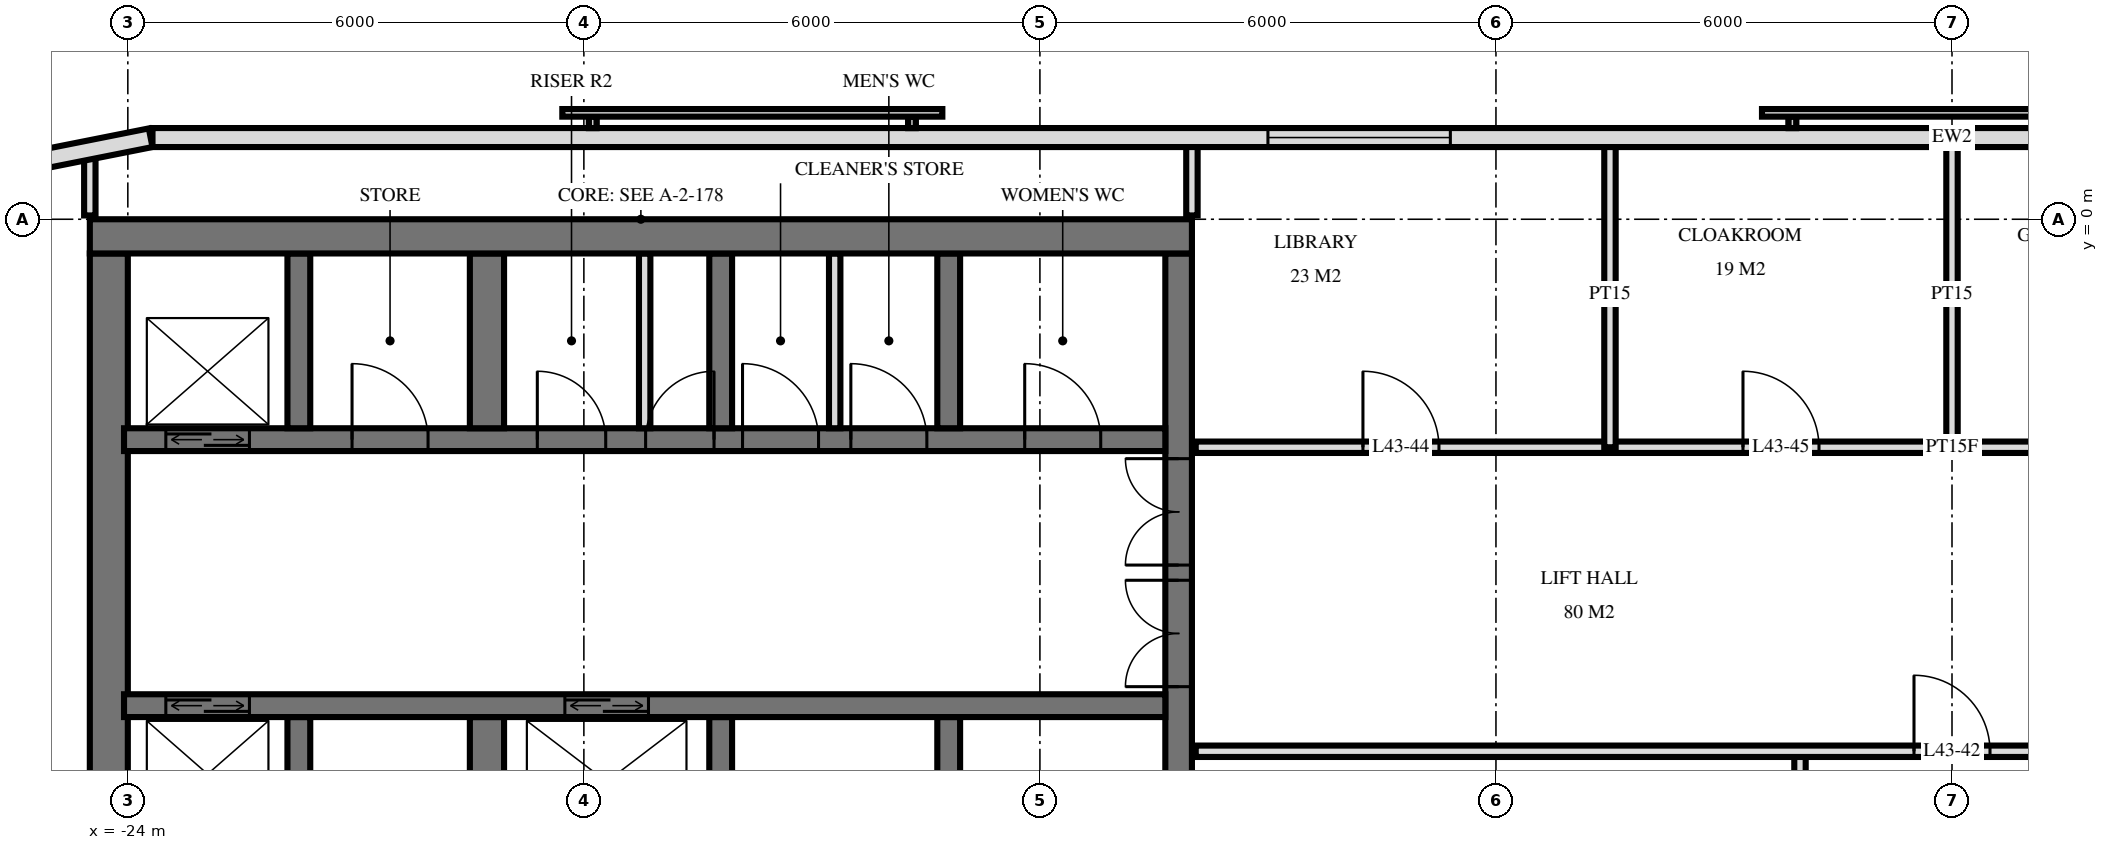
"""IFC4 building model, lengths in metres.
Left out: names, types, materials, properties, quantities, classifications, styles, units other than length and angle.
Written with IfcOpenShell. Run it as: python <this file> out.ifc"""

import sys

from ifc_helpers import new_model, si_unit, direction, frame, frame_2d, origin, place, context, subcontext, project, spatial, rectangle, extrude, element, fill, save


model = new_model("IFC4")
c1 = context("Model", 3, precision=1e-05, world=origin(), true_north=direction((0.0, 1.0)))
c2 = subcontext(c1, "Body", "Model", "MODEL_VIEW")
j1 = project(units=[si_unit("LENGTHUNIT", "METRE"), si_unit("PLANEANGLEUNIT", "RADIAN")], contexts=[c1])
p1 = place(None, origin())
s1 = spatial("IfcSite", under=j1, at=p1, CompositionType="ELEMENT")
p2 = place(p1, origin())
s2 = spatial("IfcBuilding", under=s1, at=p2, CompositionType="ELEMENT")
p3 = place(p2, frame((0.0, 0.0, 166.8)))
s3 = spatial("IfcBuildingStorey", under=s2, at=p3, CompositionType="ELEMENT", Elevation=166.8)
p4 = place(p3, frame((-24.5, -0.225, 0.0), z_axis=(0.0, 0.0, 1.0), x_axis=(1.0, 0.0, 0.0)))
e1 = element("IfcWall", 1, at=p4, inside=s3, PredefinedType="SHEAR", context=c2, shape_type="SweptSolid", body=[
    extrude(rectangle(XDim=14.5, YDim=0.45, at=frame_2d((7.25, 0.0))), origin(), (0.0, 0.0, 1.0), 3.6),
])
p5 = place(p3, frame((-10.175, -14.55, 0.0), z_axis=(0.0, 0.0, 1.0), x_axis=(0.0, 1.0, 0.0)))
e2 = element("IfcWall", 2, at=p5, inside=s3, PredefinedType="SHEAR", context=c2, shape_type="SweptSolid", body=[
    extrude(rectangle(XDim=14.1, YDim=0.35, at=frame_2d((7.05, 0.0))), origin(), (0.0, 0.0, 1.0), 3.6),
])
p6 = place(p5, frame((8.4, 0.0, 0.0)))
e3 = element("IfcOpeningElement", 3, at=p6, cuts=e2, PredefinedType="OPENING", context=c2, shape_type="SweptSolid", body=[
    extrude(rectangle(XDim=1.4, YDim=2.4, at=frame_2d((0.7, 1.2))), frame((0.0, 0.185, 0.0), z_axis=(0.0, -1.0, 0.0), x_axis=(1.0, 0.0, 0.0)), (0.0, 0.0, 1.0), 0.37),
])
p7 = place(p5, frame((10.0, 0.0, 0.0)))
e4 = element("IfcOpeningElement", 4, at=p7, cuts=e2, PredefinedType="OPENING", context=c2, shape_type="SweptSolid", body=[
    extrude(rectangle(XDim=1.4, YDim=2.4, at=frame_2d((0.7, 1.2))), frame((0.0, 0.185, 0.0), z_axis=(0.0, -1.0, 0.0), x_axis=(1.0, 0.0, 0.0)), (0.0, 0.0, 1.0), 0.37),
])
p8 = place(p5, frame((4.0, 0.0, 0.0)))
e5 = element("IfcOpeningElement", 5, at=p8, cuts=e2, PredefinedType="OPENING", context=c2, shape_type="SweptSolid", body=[
    extrude(rectangle(XDim=1.2, YDim=2.1, at=frame_2d((0.6, 1.05))), frame((0.0, 0.185, 0.0), z_axis=(0.0, -1.0, 0.0), x_axis=(1.0, 0.0, 0.0)), (0.0, 0.0, 1.0), 0.37),
])
p9 = place(p3, frame((-24.25, -14.55, 0.0), z_axis=(0.0, 0.0, 1.0), x_axis=(0.0, 1.0, 0.0)))
e6 = element("IfcWall", 6, at=p9, inside=s3, PredefinedType="SHEAR", context=c2, shape_type="SweptSolid", body=[
    extrude(rectangle(XDim=14.1, YDim=0.5, at=frame_2d((7.05, 0.0))), origin(), (0.0, 0.0, 1.0), 3.6),
])
p10 = place(p3, frame((-24.05, -2.9, 0.0), z_axis=(0.0, 0.0, 1.0), x_axis=(1.0, 0.0, 0.0)))
e7 = element("IfcWall", 7, at=p10, inside=s3, PredefinedType="SHEAR", context=c2, shape_type="SweptSolid", body=[
    extrude(rectangle(XDim=13.7, YDim=0.3, at=frame_2d((6.85, 0.0))), origin(), (0.0, 0.0, 1.0), 3.6),
])
p11 = place(p10, frame((0.55, 0.0, 0.0)))
e8 = element("IfcOpeningElement", 8, at=p11, cuts=e7, PredefinedType="OPENING", context=c2, shape_type="SweptSolid", body=[
    extrude(rectangle(XDim=1.1, YDim=2.1, at=frame_2d((0.55, 1.05))), frame((0.0, 0.16, 0.0), z_axis=(0.0, -1.0, 0.0), x_axis=(1.0, 0.0, 0.0)), (0.0, 0.0, 1.0), 0.32),
])
p12 = place(p10, frame((6.863, 0.0, 0.0)))
e9 = element("IfcOpeningElement", 9, at=p12, cuts=e7, PredefinedType="OPENING", context=c2, shape_type="SweptSolid", body=[
    extrude(rectangle(XDim=0.9, YDim=2.1, at=frame_2d((0.45, 1.05))), frame((0.0, 0.16, 0.0), z_axis=(0.0, -1.0, 0.0), x_axis=(1.0, 0.0, 0.0)), (0.0, 0.0, 1.0), 0.32),
])
p13 = place(p10, frame((5.438, 0.0, 0.0)))
e10 = element("IfcOpeningElement", 10, at=p13, cuts=e7, PredefinedType="OPENING", context=c2, shape_type="SweptSolid", body=[
    extrude(rectangle(XDim=0.9, YDim=2.1, at=frame_2d((0.45, 1.05))), frame((0.0, 0.16, 0.0), z_axis=(0.0, -1.0, 0.0), x_axis=(1.0, 0.0, 0.0)), (0.0, 0.0, 1.0), 0.32),
])
p14 = place(p10, frame((11.85, 0.0, 0.0)))
e11 = element("IfcOpeningElement", 11, at=p14, cuts=e7, PredefinedType="OPENING", context=c2, shape_type="SweptSolid", body=[
    extrude(rectangle(XDim=1.0, YDim=2.1, at=frame_2d((0.5, 1.05))), frame((0.0, 0.16, 0.0), z_axis=(0.0, -1.0, 0.0), x_axis=(1.0, 0.0, 0.0)), (0.0, 0.0, 1.0), 0.32),
])
p15 = place(p10, frame((9.562, 0.0, 0.0)))
e12 = element("IfcOpeningElement", 12, at=p15, cuts=e7, PredefinedType="OPENING", context=c2, shape_type="SweptSolid", body=[
    extrude(rectangle(XDim=1.0, YDim=2.1, at=frame_2d((0.5, 1.05))), frame((0.0, 0.16, 0.0), z_axis=(0.0, -1.0, 0.0), x_axis=(1.0, 0.0, 0.0)), (0.0, 0.0, 1.0), 0.32),
])
p16 = place(p10, frame((8.137, 0.0, 0.0)))
e13 = element("IfcOpeningElement", 13, at=p16, cuts=e7, PredefinedType="OPENING", context=c2, shape_type="SweptSolid", body=[
    extrude(rectangle(XDim=1.0, YDim=2.1, at=frame_2d((0.5, 1.05))), frame((0.0, 0.16, 0.0), z_axis=(0.0, -1.0, 0.0), x_axis=(1.0, 0.0, 0.0)), (0.0, 0.0, 1.0), 0.32),
])
p17 = place(p10, frame((3.0, 0.0, 0.0)))
e14 = element("IfcOpeningElement", 14, at=p17, cuts=e7, PredefinedType="OPENING", context=c2, shape_type="SweptSolid", body=[
    extrude(rectangle(XDim=1.0, YDim=2.1, at=frame_2d((0.5, 1.05))), frame((0.0, 0.16, 0.0), z_axis=(0.0, -1.0, 0.0), x_axis=(1.0, 0.0, 0.0)), (0.0, 0.0, 1.0), 0.32),
])
p18 = place(p3, frame((-24.05, -6.4, 0.0), z_axis=(0.0, 0.0, 1.0), x_axis=(1.0, 0.0, 0.0)))
e15 = element("IfcWall", 15, at=p18, inside=s3, PredefinedType="SHEAR", context=c2, shape_type="SweptSolid", body=[
    extrude(rectangle(XDim=13.7, YDim=0.3, at=frame_2d((6.85, 0.0))), origin(), (0.0, 0.0, 1.0), 3.6),
])
p19 = place(p18, frame((0.55, 0.0, 0.0)))
e16 = element("IfcOpeningElement", 16, at=p19, cuts=e15, PredefinedType="OPENING", context=c2, shape_type="SweptSolid", body=[
    extrude(rectangle(XDim=1.1, YDim=2.1, at=frame_2d((0.55, 1.05))), frame((0.0, 0.16, 0.0), z_axis=(0.0, -1.0, 0.0), x_axis=(1.0, 0.0, 0.0)), (0.0, 0.0, 1.0), 0.32),
])
p20 = place(p18, frame((5.8, 0.0, 0.0)))
e17 = element("IfcOpeningElement", 17, at=p20, cuts=e15, PredefinedType="OPENING", context=c2, shape_type="SweptSolid", body=[
    extrude(rectangle(XDim=1.1, YDim=2.1, at=frame_2d((0.55, 1.05))), frame((0.0, 0.16, 0.0), z_axis=(0.0, -1.0, 0.0), x_axis=(1.0, 0.0, 0.0)), (0.0, 0.0, 1.0), 0.32),
])
for number, where, z_axis, x_axis in (
    (18, (-13.2, -2.75, 0.0), (0.0, 0.0, 1.0), (0.0, 1.0, 0.0)),
    (19, (-13.2, -8.85, 0.0), (0.0, 0.0, 1.0), (0.0, 1.0, 0.0)),
    (20, (-16.2, -2.75, 0.0), (0.0, 0.0, 1.0), (0.0, 1.0, 0.0)),
    (21, (-16.2, -8.85, 0.0), (0.0, 0.0, 1.0), (0.0, 1.0, 0.0)),
):
    element("IfcWall", number, at=place(p3, frame(where, z_axis=z_axis, x_axis=x_axis)), inside=s3, PredefinedType="SHEAR", context=c2, shape_type="SweptSolid", body=[
        extrude(rectangle(XDim=2.3, YDim=0.3, at=frame_2d((1.15, 0.0))), origin(), (0.0, 0.0, 1.0), 3.6),
    ])
for number, where, z_axis, x_axis in (
    (22, (-19.275, -2.75, 0.0), (0.0, 0.0, 1.0), (0.0, 1.0, 0.0)),
    (23, (-19.275, -8.85, 0.0), (0.0, 0.0, 1.0), (0.0, 1.0, 0.0)),
):
    element("IfcWall", number, at=place(p3, frame(where, z_axis=z_axis, x_axis=x_axis)), inside=s3, PredefinedType="SHEAR", context=c2, shape_type="SweptSolid", body=[
        extrude(rectangle(XDim=2.3, YDim=0.45, at=frame_2d((1.15, 0.0))), origin(), (0.0, 0.0, 1.0), 3.6),
    ])
for number, where, z_axis, x_axis in (
    (24, (-21.75, -2.75, 0.0), (0.0, 0.0, 1.0), (0.0, 1.0, 0.0)),
    (25, (-21.75, -8.85, 0.0), (0.0, 0.0, 1.0), (0.0, 1.0, 0.0)),
):
    element("IfcWall", number, at=place(p3, frame(where, z_axis=z_axis, x_axis=x_axis)), inside=s3, PredefinedType="SHEAR", context=c2, shape_type="SweptSolid", body=[
        extrude(rectangle(XDim=2.3, YDim=0.3, at=frame_2d((1.15, 0.0))), origin(), (0.0, 0.0, 1.0), 3.6),
    ])
p21 = place(p3, frame((23.675, 1.075, 0.0), z_axis=(0.0, 0.0, 1.0), x_axis=(-1.0, 0.0, 0.0)))
e26 = element("IfcWall", 26, at=p21, inside=s3, PredefinedType="SOLIDWALL", context=c2, shape_type="SweptSolid", body=[
    extrude(rectangle(XDim=47.351, YDim=0.25, at=frame_2d((23.675, 0.0))), origin(), (0.0, 0.0, 1.0), 3.32),
])
p22 = place(p21, frame((20.225, 0.0, 0.3)))
e27 = element("IfcOpeningElement", 27, at=p22, cuts=e26, PredefinedType="OPENING", context=c2, shape_type="SweptSolid", body=[
    extrude(rectangle(XDim=2.4, YDim=2.1, at=frame_2d((1.2, 1.05))), frame((0.0, 0.135, 0.0), z_axis=(0.0, -1.0, 0.0), x_axis=(1.0, 0.0, 0.0)), (0.0, 0.0, 1.0), 0.27),
])
p23 = place(p21, frame((30.275, 0.0, 0.3)))
e28 = element("IfcOpeningElement", 28, at=p23, cuts=e26, PredefinedType="OPENING", context=c2, shape_type="SweptSolid", body=[
    extrude(rectangle(XDim=2.4, YDim=2.1, at=frame_2d((1.2, 1.05))), frame((0.0, 0.135, 0.0), z_axis=(0.0, -1.0, 0.0), x_axis=(1.0, 0.0, 0.0)), (0.0, 0.0, 1.0), 0.27),
])
p24 = place(p3, frame((-23.7, 1.073, 0.0), z_axis=(0.0, 0.0, 1.0), x_axis=(-0.980803419081, -0.194999110559, 0.0)))
e29 = element("IfcWall", 29, at=p24, inside=s3, PredefinedType="SOLIDWALL", context=c2, shape_type="SweptSolid", body=[
    extrude(rectangle(XDim=1.681, YDim=0.25, at=frame_2d((0.841, 0.0))), origin(), (0.0, 0.0, 1.0), 3.32),
])
for number, where, z_axis, x_axis in (
    (30, (-17.2, -2.75, 0.0), (0.0, 0.0, 1.0), (0.0, 1.0, 0.0)),
    (31, (-14.7, -2.75, 0.0), (0.0, 0.0, 1.0), (0.0, 1.0, 0.0)),
):
    element("IfcWall", number, at=place(p3, frame(where, z_axis=z_axis, x_axis=x_axis)), inside=s3, PredefinedType="PARTITIONING", context=c2, shape_type="SweptSolid", body=[
        extrude(rectangle(XDim=2.3, YDim=0.15, at=frame_2d((1.15, 0.0))), origin(), (0.0, 0.0, 1.0), 3.3),
    ])
p25 = place(p3, frame((0.0, -3.0, 0.0), z_axis=(0.0, 0.0, 1.0), x_axis=(0.0, 1.0, 0.0)))
e32 = element("IfcWall", 32, at=p25, inside=s3, PredefinedType="PARTITIONING", context=c2, shape_type="SweptSolid", body=[
    extrude(rectangle(XDim=4.02, YDim=0.15, at=frame_2d((2.01, 0.0))), origin(), (0.0, 0.0, 1.0), 3.32),
])
p26 = place(p3, frame((-2.0, -11.0, 0.0), z_axis=(0.0, 0.0, 1.0), x_axis=(0.0, 1.0, 0.0)))
e33 = element("IfcWall", 33, at=p26, inside=s3, PredefinedType="PARTITIONING", context=c2, shape_type="SweptSolid", body=[
    extrude(rectangle(XDim=4.0, YDim=0.15, at=frame_2d((2.0, 0.0))), origin(), (0.0, 0.0, 1.0), 3.32),
])
p27 = place(p3, frame((-4.5, -3.0, 0.0), z_axis=(0.0, 0.0, 1.0), x_axis=(0.0, 1.0, 0.0)))
e34 = element("IfcWall", 34, at=p27, inside=s3, PredefinedType="PARTITIONING", context=c2, shape_type="SweptSolid", body=[
    extrude(rectangle(XDim=4.02, YDim=0.15, at=frame_2d((2.01, 0.0))), origin(), (0.0, 0.0, 1.0), 3.32),
])
p28 = place(p3, frame((-10.0, 0.05, 0.0), z_axis=(0.0, 0.0, 1.0), x_axis=(0.0, 1.0, 0.0)))
e35 = element("IfcWall", 35, at=p28, inside=s3, PredefinedType="PARTITIONING", context=c2, shape_type="SweptSolid", body=[
    extrude(rectangle(XDim=0.97, YDim=0.15, at=frame_2d((0.485, 0.0))), origin(), (0.0, 0.0, 1.0), 3.32),
])
p29 = place(p3, frame((-24.5, 0.05, 0.0), z_axis=(0.0, 0.0, 1.0), x_axis=(0.0, 1.0, 0.0)))
e36 = element("IfcWall", 36, at=p29, inside=s3, PredefinedType="PARTITIONING", context=c2, shape_type="SweptSolid", body=[
    extrude(rectangle(XDim=0.807, YDim=0.15, at=frame_2d((0.404, 0.0))), origin(), (0.0, 0.0, 1.0), 3.32),
])
p30 = place(p3, frame((-9.95, -7.0, 0.0), z_axis=(0.0, 0.0, 1.0), x_axis=(1.0, 0.0, 0.0)))
e37 = element("IfcWall", 37, at=p30, inside=s3, PredefinedType="PARTITIONING", context=c2, shape_type="SweptSolid", body=[
    extrude(rectangle(XDim=19.9, YDim=0.15, at=frame_2d((9.95, 0.0))), origin(), (0.0, 0.0, 1.0), 3.32),
])
p31 = place(p30, frame((9.45, 0.0, 0.0)))
e38 = element("IfcOpeningElement", 38, at=p31, cuts=e37, PredefinedType="OPENING", context=c2, shape_type="SweptSolid", body=[
    extrude(rectangle(XDim=1.0, YDim=2.1, at=frame_2d((0.5, 1.05))), frame((0.0, 0.085, 0.0), z_axis=(0.0, -1.0, 0.0), x_axis=(1.0, 0.0, 0.0)), (0.0, 0.0, 1.0), 0.17),
])
p32 = place(p30, frame((15.45, 0.0, 0.0)))
e39 = element("IfcOpeningElement", 39, at=p32, cuts=e37, PredefinedType="OPENING", context=c2, shape_type="SweptSolid", body=[
    extrude(rectangle(XDim=1.0, YDim=2.1, at=frame_2d((0.5, 1.05))), frame((0.0, 0.085, 0.0), z_axis=(0.0, -1.0, 0.0), x_axis=(1.0, 0.0, 0.0)), (0.0, 0.0, 1.0), 0.17),
])
p33 = place(p3, frame((-9.95, -3.0, 0.0), z_axis=(0.0, 0.0, 1.0), x_axis=(1.0, 0.0, 0.0)))
e40 = element("IfcWall", 40, at=p33, inside=s3, PredefinedType="PARTITIONING", context=c2, shape_type="SweptSolid", body=[
    extrude(rectangle(XDim=19.9, YDim=0.15, at=frame_2d((9.95, 0.0))), origin(), (0.0, 0.0, 1.0), 3.32),
])
p34 = place(p33, frame((2.2, 0.0, 0.0)))
e41 = element("IfcOpeningElement", 41, at=p34, cuts=e40, PredefinedType="OPENING", context=c2, shape_type="SweptSolid", body=[
    extrude(rectangle(XDim=1.0, YDim=2.1, at=frame_2d((0.5, 1.05))), frame((0.0, 0.085, 0.0), z_axis=(0.0, -1.0, 0.0), x_axis=(1.0, 0.0, 0.0)), (0.0, 0.0, 1.0), 0.17),
])
p35 = place(p33, frame((7.2, 0.0, 0.0)))
e42 = element("IfcOpeningElement", 42, at=p35, cuts=e40, PredefinedType="OPENING", context=c2, shape_type="SweptSolid", body=[
    extrude(rectangle(XDim=1.0, YDim=2.1, at=frame_2d((0.5, 1.05))), frame((0.0, 0.085, 0.0), z_axis=(0.0, -1.0, 0.0), x_axis=(1.0, 0.0, 0.0)), (0.0, 0.0, 1.0), 0.17),
])
p36 = place(p33, frame((11.7, 0.0, 0.0)))
e43 = element("IfcOpeningElement", 43, at=p36, cuts=e40, PredefinedType="OPENING", context=c2, shape_type="SweptSolid", body=[
    extrude(rectangle(XDim=1.0, YDim=2.1, at=frame_2d((0.5, 1.05))), frame((0.0, 0.085, 0.0), z_axis=(0.0, -1.0, 0.0), x_axis=(1.0, 0.0, 0.0)), (0.0, 0.0, 1.0), 0.17),
])
p37 = place(p33, frame((15.45, 0.0, 0.0)))
e44 = element("IfcOpeningElement", 44, at=p37, cuts=e40, PredefinedType="OPENING", context=c2, shape_type="SweptSolid", body=[
    extrude(rectangle(XDim=1.0, YDim=2.1, at=frame_2d((0.5, 1.05))), frame((0.0, 0.085, 0.0), z_axis=(0.0, -1.0, 0.0), x_axis=(1.0, 0.0, 0.0)), (0.0, 0.0, 1.0), 0.17),
])
p38 = place(p33, frame((18.2, 0.0, 0.0)))
e45 = element("IfcOpeningElement", 45, at=p38, cuts=e40, PredefinedType="OPENING", context=c2, shape_type="SweptSolid", body=[
    extrude(rectangle(XDim=1.0, YDim=2.1, at=frame_2d((0.5, 1.05))), frame((0.0, 0.085, 0.0), z_axis=(0.0, -1.0, 0.0), x_axis=(1.0, 0.0, 0.0)), (0.0, 0.0, 1.0), 0.17),
])
p39 = place(p23, origin())
e46 = element("IfcWindow", 46, at=p39, inside=s3, PartitioningType="SINGLE_PANEL", PredefinedType="WINDOW", context=c2, shape_type="SweptSolid", body=[
    extrude(rectangle(XDim=2.4, YDim=2.1, at=frame_2d((1.2, 1.05))), frame((0.0, 0.03, 0.0), z_axis=(0.0, -1.0, 0.0), x_axis=(1.0, 0.0, 0.0)), (0.0, 0.0, 1.0), 0.06),
])
fill(e28, e46)
p40 = place(p11, origin())
e47 = element("IfcDoor", 47, at=p40, inside=s3, OperationType="DOUBLE_DOOR_SLIDING", PredefinedType="USERDEFINED", context=c2, shape_type="SweptSolid", body=[
    extrude(rectangle(XDim=1.1, YDim=2.1, at=frame_2d((0.55, 1.05))), frame((0.0, 0.025, 0.0), z_axis=(0.0, -1.0, 0.0), x_axis=(1.0, 0.0, 0.0)), (0.0, 0.0, 1.0), 0.05),
])
fill(e8, e47)
p41 = place(p19, origin())
e48 = element("IfcDoor", 48, at=p41, inside=s3, OperationType="DOUBLE_DOOR_SLIDING", PredefinedType="USERDEFINED", context=c2, shape_type="SweptSolid", body=[
    extrude(rectangle(XDim=1.1, YDim=2.1, at=frame_2d((0.55, 1.05))), frame((0.0, 0.025, 0.0), z_axis=(0.0, -1.0, 0.0), x_axis=(1.0, 0.0, 0.0)), (0.0, 0.0, 1.0), 0.05),
])
fill(e16, e48)
p42 = place(p20, origin())
e49 = element("IfcDoor", 49, at=p42, inside=s3, OperationType="DOUBLE_DOOR_SLIDING", PredefinedType="USERDEFINED", context=c2, shape_type="SweptSolid", body=[
    extrude(rectangle(XDim=1.1, YDim=2.1, at=frame_2d((0.55, 1.05))), frame((0.0, 0.025, 0.0), z_axis=(0.0, -1.0, 0.0), x_axis=(1.0, 0.0, 0.0)), (0.0, 0.0, 1.0), 0.05),
])
fill(e17, e49)
p43 = place(p6, origin())
e50 = element("IfcDoor", 50, at=p43, inside=s3, OperationType="DOUBLE_DOOR_SINGLE_SWING", PredefinedType="DOOR", context=c2, shape_type="SweptSolid", body=[
    extrude(rectangle(XDim=1.4, YDim=2.4, at=frame_2d((0.7, 1.2))), frame((0.0, 0.025, 0.0), z_axis=(0.0, -1.0, 0.0), x_axis=(1.0, 0.0, 0.0)), (0.0, 0.0, 1.0), 0.05),
])
fill(e3, e50)
p44 = place(p7, origin())
e51 = element("IfcDoor", 51, at=p44, inside=s3, OperationType="DOUBLE_DOOR_SINGLE_SWING", PredefinedType="DOOR", context=c2, shape_type="SweptSolid", body=[
    extrude(rectangle(XDim=1.4, YDim=2.4, at=frame_2d((0.7, 1.2))), frame((0.0, 0.025, 0.0), z_axis=(0.0, -1.0, 0.0), x_axis=(1.0, 0.0, 0.0)), (0.0, 0.0, 1.0), 0.05),
])
fill(e4, e51)
p45 = place(p12, origin())
e52 = element("IfcDoor", 52, at=p45, inside=s3, OperationType="SINGLE_SWING_LEFT", PredefinedType="DOOR", context=c2, shape_type="SweptSolid", body=[
    extrude(rectangle(XDim=0.9, YDim=2.1, at=frame_2d((0.45, 1.05))), frame((0.0, 0.025, 0.0), z_axis=(0.0, -1.0, 0.0), x_axis=(1.0, 0.0, 0.0)), (0.0, 0.0, 1.0), 0.05),
])
fill(e9, e52)
p46 = place(p13, origin())
e53 = element("IfcDoor", 53, at=p46, inside=s3, OperationType="SINGLE_SWING_RIGHT", PredefinedType="DOOR", context=c2, shape_type="SweptSolid", body=[
    extrude(rectangle(XDim=0.9, YDim=2.1, at=frame_2d((0.45, 1.05))), frame((0.0, 0.025, 0.0), z_axis=(0.0, -1.0, 0.0), x_axis=(1.0, 0.0, 0.0)), (0.0, 0.0, 1.0), 0.05),
])
fill(e10, e53)
p47 = place(p14, origin())
e54 = element("IfcDoor", 54, at=p47, inside=s3, OperationType="SINGLE_SWING_RIGHT", PredefinedType="DOOR", context=c2, shape_type="SweptSolid", body=[
    extrude(rectangle(XDim=1.0, YDim=2.1, at=frame_2d((0.5, 1.05))), frame((0.0, 0.025, 0.0), z_axis=(0.0, -1.0, 0.0), x_axis=(1.0, 0.0, 0.0)), (0.0, 0.0, 1.0), 0.05),
])
fill(e11, e54)
p48 = place(p15, origin())
e55 = element("IfcDoor", 55, at=p48, inside=s3, OperationType="SINGLE_SWING_RIGHT", PredefinedType="DOOR", context=c2, shape_type="SweptSolid", body=[
    extrude(rectangle(XDim=1.0, YDim=2.1, at=frame_2d((0.5, 1.05))), frame((0.0, 0.025, 0.0), z_axis=(0.0, -1.0, 0.0), x_axis=(1.0, 0.0, 0.0)), (0.0, 0.0, 1.0), 0.05),
])
fill(e12, e55)
p49 = place(p16, origin())
e56 = element("IfcDoor", 56, at=p49, inside=s3, OperationType="SINGLE_SWING_RIGHT", PredefinedType="DOOR", context=c2, shape_type="SweptSolid", body=[
    extrude(rectangle(XDim=1.0, YDim=2.1, at=frame_2d((0.5, 1.05))), frame((0.0, 0.025, 0.0), z_axis=(0.0, -1.0, 0.0), x_axis=(1.0, 0.0, 0.0)), (0.0, 0.0, 1.0), 0.05),
])
fill(e13, e56)
p50 = place(p17, origin())
e57 = element("IfcDoor", 57, at=p50, inside=s3, OperationType="SINGLE_SWING_RIGHT", PredefinedType="DOOR", context=c2, shape_type="SweptSolid", body=[
    extrude(rectangle(XDim=1.0, YDim=2.1, at=frame_2d((0.5, 1.05))), frame((0.0, 0.025, 0.0), z_axis=(0.0, -1.0, 0.0), x_axis=(1.0, 0.0, 0.0)), (0.0, 0.0, 1.0), 0.05),
])
fill(e14, e57)
p51 = place(p31, origin())
e58 = element("IfcDoor", 58, at=p51, inside=s3, OperationType="SINGLE_SWING_RIGHT", PredefinedType="DOOR", context=c2, shape_type="SweptSolid", body=[
    extrude(rectangle(XDim=1.0, YDim=2.1, at=frame_2d((0.5, 1.05))), frame((0.0, 0.025, 0.0), z_axis=(0.0, -1.0, 0.0), x_axis=(1.0, 0.0, 0.0)), (0.0, 0.0, 1.0), 0.05),
])
fill(e38, e58)
p52 = place(p34, origin())
e59 = element("IfcDoor", 59, at=p52, inside=s3, OperationType="SINGLE_SWING_RIGHT", PredefinedType="DOOR", context=c2, shape_type="SweptSolid", body=[
    extrude(rectangle(XDim=1.0, YDim=2.1, at=frame_2d((0.5, 1.05))), frame((0.0, 0.025, 0.0), z_axis=(0.0, -1.0, 0.0), x_axis=(1.0, 0.0, 0.0)), (0.0, 0.0, 1.0), 0.05),
])
fill(e41, e59)
p53 = place(p35, origin())
e60 = element("IfcDoor", 60, at=p53, inside=s3, OperationType="SINGLE_SWING_RIGHT", PredefinedType="DOOR", context=c2, shape_type="SweptSolid", body=[
    extrude(rectangle(XDim=1.0, YDim=2.1, at=frame_2d((0.5, 1.05))), frame((0.0, 0.025, 0.0), z_axis=(0.0, -1.0, 0.0), x_axis=(1.0, 0.0, 0.0)), (0.0, 0.0, 1.0), 0.05),
])
fill(e42, e60)
save(model, sys.argv[1])
